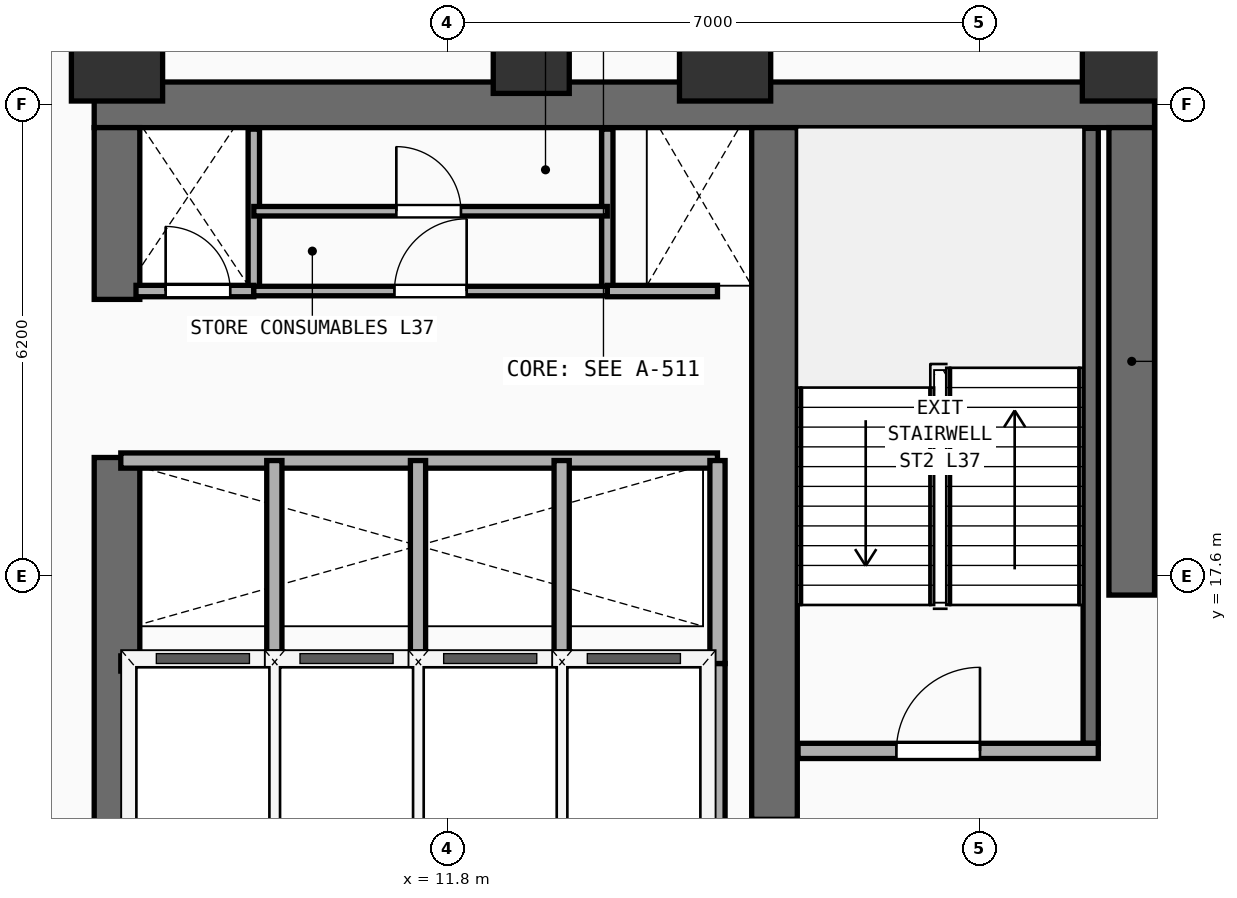
"""IFC4 building model, lengths in metres.
Left out: names, types, materials, properties, quantities, classifications, styles, units other than length and angle.
Written with IfcOpenShell. Run it as: python <this file> out.ifc"""

import sys

from ifc_helpers import new_model, si_unit, direction, frame, frame_2d, origin, origin_2d, place, context, subcontext, project, spatial, rectangle, extrude, element, fill, save


model = new_model("IFC4")
c1 = context("Model", 3, precision=1e-05, world=origin(), true_north=direction((0.0, 1.0)))
c2 = subcontext(c1, "Body", "Model", "MODEL_VIEW")
j1 = project(units=[si_unit("LENGTHUNIT", "METRE"), si_unit("PLANEANGLEUNIT", "RADIAN")], contexts=[c1])
p1 = place(None, origin())
s1 = spatial("IfcSite", under=j1, at=p1, CompositionType="ELEMENT")
p2 = place(p1, origin())
s2 = spatial("IfcBuilding", under=s1, at=p2, CompositionType="ELEMENT")
p3 = place(p2, frame((0.0, 0.0, 146.2)))
s3 = spatial("IfcBuildingStorey", under=s2, at=p3, CompositionType="ELEMENT", Elevation=146.2)
p4 = place(p3, frame((7.15, 23.8, 0.0), z_axis=(0.0, 0.0, 1.0), x_axis=(1.0, 0.0, 0.0)))
e1 = element("IfcWall", 1, at=p4, inside=s3, PredefinedType="SHEAR", context=c2, shape_type="SweptSolid", body=[
    extrude(rectangle(XDim=13.95, YDim=0.6, at=frame_2d((6.975, 0.0))), origin(), (0.0, 0.0, 1.0), 3.56),
])
p5 = place(p3, frame((7.45, 14.35, 0.0), z_axis=(0.0, 0.0, 1.0), x_axis=(0.0, 1.0, 0.0)))
e2 = element("IfcWall", 2, at=p5, inside=s3, PredefinedType="SHEAR", context=c2, shape_type="SweptSolid", body=[
    extrude(rectangle(XDim=4.81, YDim=0.6, at=frame_2d((2.405, 0.0))), origin(), (0.0, 0.0, 1.0), 3.56),
])
p6 = place(p3, frame((7.45, 21.24, 0.0), z_axis=(0.0, 0.0, 1.0), x_axis=(0.0, 1.0, 0.0)))
e3 = element("IfcWall", 3, at=p6, inside=s3, PredefinedType="SHEAR", context=c2, shape_type="SweptSolid", body=[
    extrude(rectangle(XDim=2.26, YDim=0.6, at=frame_2d((1.13, 0.0))), origin(), (0.0, 0.0, 1.0), 3.56),
])
p7 = place(p3, frame((20.8, 17.35, 0.0), z_axis=(0.0, 0.0, 1.0), x_axis=(0.0, 1.0, 0.0)))
e4 = element("IfcWall", 4, at=p7, inside=s3, PredefinedType="SHEAR", context=c2, shape_type="SweptSolid", body=[
    extrude(rectangle(XDim=6.15, YDim=0.6, at=frame_2d((3.075, 0.0))), origin(), (0.0, 0.0, 1.0), 3.56),
])
p8 = place(p3, frame((16.1, 14.4, 0.0), z_axis=(0.0, 0.0, 1.0), x_axis=(0.0, 1.0, 0.0)))
e5 = element("IfcWall", 5, at=p8, inside=s3, PredefinedType="SHEAR", context=c2, shape_type="SweptSolid", body=[
    extrude(rectangle(XDim=9.1, YDim=0.6, at=frame_2d((4.55, 0.0))), origin(), (0.0, 0.0, 1.0), 3.56),
])
for number, where, z_axis, x_axis in (
    (6, (7.45, 24.45, 0.0), (0.0, 0.0, 1.0), (1.0, 0.0, 0.0)),
    (7, (15.45, 24.45, 0.0), (0.0, 0.0, 1.0), (1.0, 0.0, 0.0)),
    (8, (20.75, 24.45, 0.0), (0.0, 0.0, 1.0), (1.0, 0.0, 0.0)),
):
    element("IfcColumn", number, at=place(p3, frame(where, z_axis=z_axis, x_axis=x_axis)), inside=s3, PredefinedType="COLUMN", context=c2, shape_type="SweptSolid", body=[
        extrude(rectangle(XDim=1.2, YDim=1.2, at=origin_2d()), origin(), (0.0, 0.0, 1.0), 3.56),
    ])
p9 = place(p3, frame((12.9, 24.45, 0.0), z_axis=(0.0, 0.0, 1.0), x_axis=(1.0, 0.0, 0.0)))
e9 = element("IfcColumn", 9, at=p9, inside=s3, PredefinedType="COLUMN", context=c2, shape_type="SweptSolid", body=[
    extrude(rectangle(XDim=1.0, YDim=1.0, at=origin_2d()), origin(), (0.0, 0.0, 1.0), 3.56),
])
p10 = place(p3, frame((20.26, 15.4, 0.0), z_axis=(0.0, 0.0, 1.0), x_axis=(0.0, 1.0, 0.0)))
e10 = element("IfcWall", 10, at=p10, inside=s3, PredefinedType="SHEAR", context=c2, shape_type="SweptSolid", body=[
    extrude(rectangle(XDim=8.09, YDim=0.2, at=frame_2d((4.045, 0.0))), origin(), (0.0, 0.0, 1.0), 3.56),
])
p11 = place(p3, frame((16.41, 15.3, 0.0), z_axis=(0.0, 0.0, 1.0), x_axis=(1.0, 0.0, 0.0)))
e11 = element("IfcWall", 11, at=p11, inside=s3, PredefinedType="PARTITIONING", context=c2, shape_type="SweptSolid", body=[
    extrude(rectangle(XDim=3.95, YDim=0.2, at=frame_2d((1.975, 0.0))), origin(), (0.0, 0.0, 1.0), 3.56),
])
p12 = place(p11, frame((1.294, 0.0, 0.0)))
e12 = element("IfcOpeningElement", 12, at=p12, cuts=e11, PredefinedType="OPENING", context=c2, shape_type="SweptSolid", body=[
    extrude(rectangle(XDim=1.1, YDim=2.2, at=frame_2d((0.55, 1.1))), frame((0.0, 0.11, 0.0), z_axis=(0.0, -1.0, 0.0), x_axis=(1.0, 0.0, 0.0)), (0.0, 0.0, 1.0), 0.22),
])
p13 = place(p3, frame((7.5, 16.45, 0.0), z_axis=(0.0, 0.0, 1.0), x_axis=(1.0, 0.0, 0.0)))
e13 = element("IfcWall", 13, at=p13, inside=s3, PredefinedType="PARTITIONING", context=c2, shape_type="SweptSolid", body=[
    extrude(rectangle(XDim=7.85, YDim=0.2, at=frame_2d((3.925, 0.0))), origin(), (0.0, 0.0, 1.0), 3.56),
])
for number, where, z_axis, x_axis in (
    (14, (15.35, 14.22, 0.0), (0.0, 0.0, 1.0), (0.0, 1.0, 0.0)),
    (15, (9.52, 14.22, 0.0), (0.0, 0.0, 1.0), (0.0, 1.0, 0.0)),
    (16, (11.41, 14.22, 0.0), (0.0, 0.0, 1.0), (0.0, 1.0, 0.0)),
    (17, (13.3, 14.22, 0.0), (0.0, 0.0, 1.0), (0.0, 1.0, 0.0)),
):
    element("IfcWall", number, at=place(p3, frame(where, z_axis=z_axis, x_axis=x_axis)), inside=s3, PredefinedType="PARTITIONING", context=c2, shape_type="SweptSolid", body=[
        extrude(rectangle(XDim=2.23, YDim=0.2, at=frame_2d((1.115, 0.0))), origin(), (0.0, 0.0, 1.0), 3.56),
    ])
p14 = place(p3, frame((7.5, 19.12, 0.0), z_axis=(0.0, 0.0, 1.0), x_axis=(1.0, 0.0, 0.0)))
e18 = element("IfcWall", 18, at=p14, inside=s3, PredefinedType="PARTITIONING", context=c2, shape_type="SweptSolid", body=[
    extrude(rectangle(XDim=7.85, YDim=0.2, at=frame_2d((3.925, 0.0))), origin(), (0.0, 0.0, 1.0), 3.56),
])
for number, where, z_axis, x_axis in (
    (19, (15.35, 16.45, 0.0), (0.0, 0.0, 1.0), (0.0, 1.0, 0.0)),
    (20, (9.52, 16.45, 0.0), (0.0, 0.0, 1.0), (0.0, 1.0, 0.0)),
    (21, (11.41, 16.45, 0.0), (0.0, 0.0, 1.0), (0.0, 1.0, 0.0)),
    (22, (13.3, 16.45, 0.0), (0.0, 0.0, 1.0), (0.0, 1.0, 0.0)),
):
    element("IfcWall", number, at=place(p3, frame(where, z_axis=z_axis, x_axis=x_axis)), inside=s3, PredefinedType="PARTITIONING", context=c2, shape_type="SweptSolid", body=[
        extrude(rectangle(XDim=2.67, YDim=0.2, at=frame_2d((1.335, 0.0))), origin(), (0.0, 0.0, 1.0), 3.56),
    ])
for number, where, z_axis, x_axis in (
    (23, (9.25, 21.35, 0.0), (0.0, 0.0, 1.0), (0.0, 1.0, 0.0)),
    (24, (13.9, 21.35, 0.0), (0.0, 0.0, 1.0), (0.0, 1.0, 0.0)),
):
    element("IfcWall", number, at=place(p3, frame(where, z_axis=z_axis, x_axis=x_axis)), inside=s3, PredefinedType="PARTITIONING", context=c2, shape_type="SweptSolid", body=[
        extrude(rectangle(XDim=2.13, YDim=0.15, at=frame_2d((1.065, 0.0))), origin(), (0.0, 0.0, 1.0), 3.56),
    ])
p15 = place(p3, frame((7.7, 21.35, 0.0), z_axis=(0.0, 0.0, 1.0), x_axis=(1.0, 0.0, 0.0)))
e25 = element("IfcWall", 25, at=p15, inside=s3, PredefinedType="PARTITIONING", context=c2, shape_type="SweptSolid", body=[
    extrude(rectangle(XDim=1.55, YDim=0.15, at=frame_2d((0.775, 0.0))), origin(), (0.0, 0.0, 1.0), 3.56),
])
p16 = place(p15, frame((0.39, 0.0, 0.0)))
e26 = element("IfcOpeningElement", 26, at=p16, cuts=e25, PredefinedType="OPENING", context=c2, shape_type="SweptSolid", body=[
    extrude(rectangle(XDim=0.85, YDim=2.15, at=frame_2d((0.425, 1.075))), frame((0.0, 0.085, 0.0), z_axis=(0.0, -1.0, 0.0), x_axis=(1.0, 0.0, 0.0)), (0.0, 0.0, 1.0), 0.17),
])
p17 = place(p3, frame((13.9, 21.35, 0.0), z_axis=(0.0, 0.0, 1.0), x_axis=(1.0, 0.0, 0.0)))
e27 = element("IfcWall", 27, at=p17, inside=s3, PredefinedType="PARTITIONING", context=c2, shape_type="SweptSolid", body=[
    extrude(rectangle(XDim=1.45, YDim=0.15, at=frame_2d((0.725, 0.0))), origin(), (0.0, 0.0, 1.0), 3.56),
])
p18 = place(p3, frame((9.25, 21.35, 0.0), z_axis=(0.0, 0.0, 1.0), x_axis=(1.0, 0.0, 0.0)))
e28 = element("IfcWall", 28, at=p18, inside=s3, PredefinedType="PARTITIONING", context=c2, shape_type="SweptSolid", body=[
    extrude(rectangle(XDim=4.65, YDim=0.125, at=frame_2d((2.325, 0.0))), origin(), (0.0, 0.0, 1.0), 3.56),
])
p19 = place(p18, frame((1.85, 0.0, 0.0)))
e29 = element("IfcOpeningElement", 29, at=p19, cuts=e28, PredefinedType="OPENING", context=c2, shape_type="SweptSolid", body=[
    extrude(rectangle(XDim=0.95, YDim=2.15, at=frame_2d((0.475, 1.075))), frame((0.0, 0.073, 0.0), z_axis=(0.0, -1.0, 0.0), x_axis=(1.0, 0.0, 0.0)), (0.0, 0.0, 1.0), 0.145),
])
p20 = place(p3, frame((9.25, 22.4, 0.0), z_axis=(0.0, 0.0, 1.0), x_axis=(1.0, 0.0, 0.0)))
e30 = element("IfcWall", 30, at=p20, inside=s3, PredefinedType="PARTITIONING", context=c2, shape_type="SweptSolid", body=[
    extrude(rectangle(XDim=4.65, YDim=0.125, at=frame_2d((2.325, 0.0))), origin(), (0.0, 0.0, 1.0), 3.56),
])
p21 = place(p20, frame((1.875, 0.0, 0.0)))
e31 = element("IfcOpeningElement", 31, at=p21, cuts=e30, PredefinedType="OPENING", context=c2, shape_type="SweptSolid", body=[
    extrude(rectangle(XDim=0.85, YDim=2.15, at=frame_2d((0.425, 1.075))), frame((0.0, 0.073, 0.0), z_axis=(0.0, -1.0, 0.0), x_axis=(1.0, 0.0, 0.0)), (0.0, 0.0, 1.0), 0.145),
])
p22 = place(p12, origin())
e32 = element("IfcDoor", 32, at=p22, inside=s3, OperationType="SINGLE_SWING_RIGHT", PredefinedType="DOOR", context=c2, shape_type="SweptSolid", body=[
    extrude(rectangle(XDim=1.1, YDim=2.2, at=frame_2d((0.55, 1.1))), frame((0.0, 0.025, 0.0), z_axis=(0.0, -1.0, 0.0), x_axis=(1.0, 0.0, 0.0)), (0.0, 0.0, 1.0), 0.05),
])
fill(e12, e32)
p23 = place(p16, origin())
e33 = element("IfcDoor", 33, at=p23, inside=s3, OperationType="SINGLE_SWING_LEFT", PredefinedType="DOOR", context=c2, shape_type="SweptSolid", body=[
    extrude(rectangle(XDim=0.85, YDim=2.15, at=frame_2d((0.425, 1.075))), frame((0.0, 0.025, 0.0), z_axis=(0.0, -1.0, 0.0), x_axis=(1.0, 0.0, 0.0)), (0.0, 0.0, 1.0), 0.05),
])
fill(e26, e33)
p24 = place(p19, origin())
e34 = element("IfcDoor", 34, at=p24, inside=s3, OperationType="SINGLE_SWING_RIGHT", PredefinedType="DOOR", context=c2, shape_type="SweptSolid", body=[
    extrude(rectangle(XDim=0.95, YDim=2.15, at=frame_2d((0.475, 1.075))), frame((0.0, 0.025, 0.0), z_axis=(0.0, -1.0, 0.0), x_axis=(1.0, 0.0, 0.0)), (0.0, 0.0, 1.0), 0.05),
])
fill(e29, e34)
p25 = place(p21, origin())
e35 = element("IfcDoor", 35, at=p25, inside=s3, OperationType="SINGLE_SWING_LEFT", PredefinedType="DOOR", context=c2, shape_type="SweptSolid", body=[
    extrude(rectangle(XDim=0.85, YDim=2.15, at=frame_2d((0.425, 1.075))), frame((0.0, 0.025, 0.0), z_axis=(0.0, -1.0, 0.0), x_axis=(1.0, 0.0, 0.0)), (0.0, 0.0, 1.0), 0.05),
])
fill(e31, e35)
save(model, sys.argv[1])
